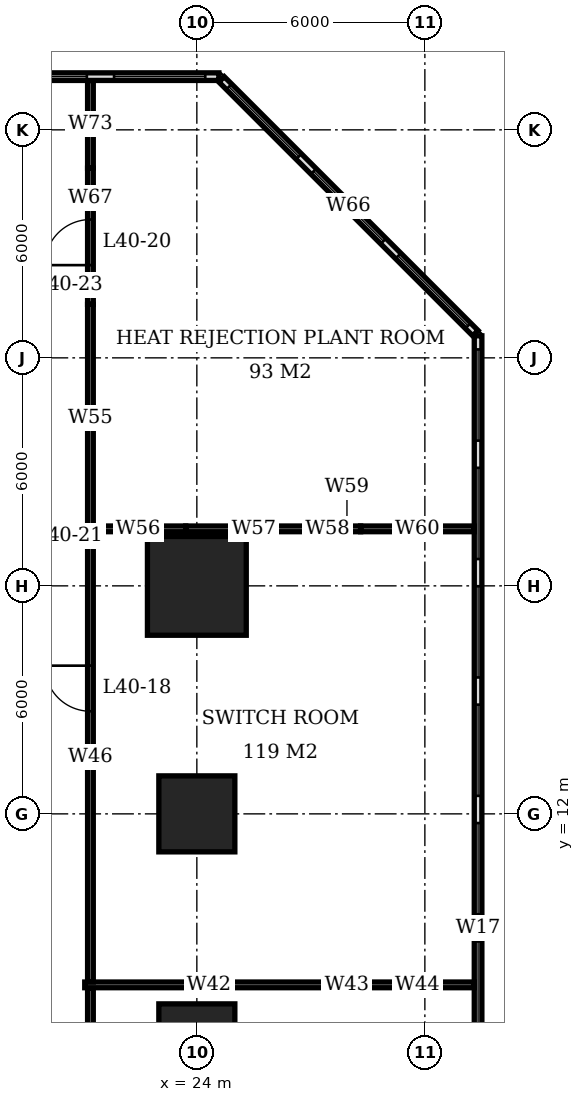
"""IFC4 building model, lengths in metres.
Left out: names, types, materials, properties, quantities, classifications, styles, units other than length and angle.
Written with IfcOpenShell. Run it as: python <this file> out.ifc"""

import sys

from ifc_helpers import new_model, si_unit, direction, frame, frame_2d, origin, origin_2d, place, context, subcontext, project, spatial, rectangle, extrude, element, fill, save


model = new_model("IFC4")
c1 = context("Model", 3, precision=1e-05, world=origin(), true_north=direction((0.0, 1.0)))
c2 = subcontext(c1, "Body", "Model", "MODEL_VIEW")
j1 = project(units=[si_unit("LENGTHUNIT", "METRE"), si_unit("PLANEANGLEUNIT", "RADIAN")], contexts=[c1])
p1 = place(None, origin())
s1 = spatial("IfcSite", under=j1, at=p1, CompositionType="ELEMENT")
p2 = place(p1, origin())
s2 = spatial("IfcBuilding", under=s1, at=p2, CompositionType="ELEMENT")
p3 = place(p2, frame((0.0, 0.0, 164.0)))
s3 = spatial("IfcBuildingStorey", under=s2, at=p3, CompositionType="ELEMENT", Elevation=164.0)
for number, where, z_axis, x_axis in (
    (1, (24.0, 6.0, 0.0), (0.0, 0.0, 1.0), (1.0, 0.0, 0.0)),
    (2, (24.0, 12.0, 0.0), (0.0, 0.0, 1.0), (1.0, 0.0, 0.0)),
):
    element("IfcColumn", number, at=place(p3, frame(where, z_axis=z_axis, x_axis=x_axis)), inside=s3, PredefinedType="COLUMN", context=c2, shape_type="SweptSolid", body=[
        extrude(rectangle(XDim=2.0, YDim=2.0, at=origin_2d()), origin(), (0.0, 0.0, 1.0), 5.4),
    ])
p4 = place(p3, frame((24.0, 18.0, 0.0), z_axis=(0.0, 0.0, 1.0), x_axis=(1.0, 0.0, 0.0)))
e3 = element("IfcColumn", 3, at=p4, inside=s3, PredefinedType="COLUMN", context=c2, shape_type="SweptSolid", body=[
    extrude(rectangle(XDim=2.6, YDim=2.6, at=origin_2d()), origin(), (0.0, 0.0, 1.0), 5.4),
])
p5 = place(p3, frame((31.4, -6.58, 0.0), z_axis=(0.0, 0.0, 1.0), x_axis=(0.0, 1.0, 0.0)))
e4 = element("IfcWall", 4, at=p5, inside=s3, PredefinedType="USERDEFINED", context=c2, shape_type="SweptSolid", body=[
    extrude(rectangle(XDim=31.16, YDim=0.2, at=frame_2d((15.58, 0.0))), origin(), (0.0, 0.0, 1.0), 5.4),
])
p6 = place(p5, frame((0.358, 0.0, 0.6)))
e5 = element("IfcOpeningElement", 5, at=p6, cuts=e4, PredefinedType="OPENING", context=c2, shape_type="SweptSolid", body=[
    extrude(rectangle(XDim=2.4, YDim=3.0, at=frame_2d((1.2, 1.5))), frame((0.0, 0.11, 0.0), z_axis=(0.0, -1.0, 0.0), x_axis=(1.0, 0.0, 0.0)), (0.0, 0.0, 1.0), 0.22),
])
p7 = place(p5, frame((3.474, 0.0, 0.6)))
e6 = element("IfcOpeningElement", 6, at=p7, cuts=e4, PredefinedType="OPENING", context=c2, shape_type="SweptSolid", body=[
    extrude(rectangle(XDim=2.4, YDim=3.0, at=frame_2d((1.2, 1.5))), frame((0.0, 0.11, 0.0), z_axis=(0.0, -1.0, 0.0), x_axis=(1.0, 0.0, 0.0)), (0.0, 0.0, 1.0), 0.22),
])
p8 = place(p5, frame((6.59, 0.0, 0.6)))
e7 = element("IfcOpeningElement", 7, at=p8, cuts=e4, PredefinedType="OPENING", context=c2, shape_type="SweptSolid", body=[
    extrude(rectangle(XDim=2.4, YDim=3.0, at=frame_2d((1.2, 1.5))), frame((0.0, 0.11, 0.0), z_axis=(0.0, -1.0, 0.0), x_axis=(1.0, 0.0, 0.0)), (0.0, 0.0, 1.0), 0.22),
])
p9 = place(p5, frame((9.706, 0.0, 0.6)))
e8 = element("IfcOpeningElement", 8, at=p9, cuts=e4, PredefinedType="OPENING", context=c2, shape_type="SweptSolid", body=[
    extrude(rectangle(XDim=2.4, YDim=3.0, at=frame_2d((1.2, 1.5))), frame((0.0, 0.11, 0.0), z_axis=(0.0, -1.0, 0.0), x_axis=(1.0, 0.0, 0.0)), (0.0, 0.0, 1.0), 0.22),
])
p10 = place(p5, frame((12.822, 0.0, 0.6)))
e9 = element("IfcOpeningElement", 9, at=p10, cuts=e4, PredefinedType="OPENING", context=c2, shape_type="SweptSolid", body=[
    extrude(rectangle(XDim=2.4, YDim=3.0, at=frame_2d((1.2, 1.5))), frame((0.0, 0.11, 0.0), z_axis=(0.0, -1.0, 0.0), x_axis=(1.0, 0.0, 0.0)), (0.0, 0.0, 1.0), 0.22),
])
p11 = place(p5, frame((15.938, 0.0, 0.6)))
e10 = element("IfcOpeningElement", 10, at=p11, cuts=e4, PredefinedType="OPENING", context=c2, shape_type="SweptSolid", body=[
    extrude(rectangle(XDim=2.4, YDim=3.0, at=frame_2d((1.2, 1.5))), frame((0.0, 0.11, 0.0), z_axis=(0.0, -1.0, 0.0), x_axis=(1.0, 0.0, 0.0)), (0.0, 0.0, 1.0), 0.22),
])
p12 = place(p5, frame((19.054, 0.0, 0.6)))
e11 = element("IfcOpeningElement", 11, at=p12, cuts=e4, PredefinedType="OPENING", context=c2, shape_type="SweptSolid", body=[
    extrude(rectangle(XDim=2.4, YDim=3.0, at=frame_2d((1.2, 1.5))), frame((0.0, 0.11, 0.0), z_axis=(0.0, -1.0, 0.0), x_axis=(1.0, 0.0, 0.0)), (0.0, 0.0, 1.0), 0.22),
])
p13 = place(p5, frame((22.17, 0.0, 0.6)))
e12 = element("IfcOpeningElement", 12, at=p13, cuts=e4, PredefinedType="OPENING", context=c2, shape_type="SweptSolid", body=[
    extrude(rectangle(XDim=2.4, YDim=3.0, at=frame_2d((1.2, 1.5))), frame((0.0, 0.11, 0.0), z_axis=(0.0, -1.0, 0.0), x_axis=(1.0, 0.0, 0.0)), (0.0, 0.0, 1.0), 0.22),
])
p14 = place(p5, frame((25.286, 0.0, 0.6)))
e13 = element("IfcOpeningElement", 13, at=p14, cuts=e4, PredefinedType="OPENING", context=c2, shape_type="SweptSolid", body=[
    extrude(rectangle(XDim=2.4, YDim=3.0, at=frame_2d((1.2, 1.5))), frame((0.0, 0.11, 0.0), z_axis=(0.0, -1.0, 0.0), x_axis=(1.0, 0.0, 0.0)), (0.0, 0.0, 1.0), 0.22),
])
p15 = place(p5, frame((28.402, 0.0, 0.6)))
e14 = element("IfcOpeningElement", 14, at=p15, cuts=e4, PredefinedType="OPENING", context=c2, shape_type="SweptSolid", body=[
    extrude(rectangle(XDim=2.4, YDim=3.0, at=frame_2d((1.2, 1.5))), frame((0.0, 0.11, 0.0), z_axis=(0.0, -1.0, 0.0), x_axis=(1.0, 0.0, 0.0)), (0.0, 0.0, 1.0), 0.22),
])
p16 = place(p3, frame((31.329, 24.651, 0.0), z_axis=(0.0, 0.0, 1.0), x_axis=(-0.707106781187, 0.707106781187, 0.0)))
e15 = element("IfcWall", 15, at=p16, inside=s3, PredefinedType="USERDEFINED", context=c2, shape_type="SweptSolid", body=[
    extrude(rectangle(XDim=9.445, YDim=0.2, at=frame_2d((4.723, 0.0))), origin(), (0.0, 0.0, 1.0), 5.4),
])
p17 = place(p16, frame((0.274, 0.0, 0.6)))
e16 = element("IfcOpeningElement", 16, at=p17, cuts=e15, PredefinedType="OPENING", context=c2, shape_type="SweptSolid", body=[
    extrude(rectangle(XDim=2.6, YDim=3.0, at=frame_2d((1.3, 1.5))), frame((0.0, 0.11, 0.0), z_axis=(0.0, -1.0, 0.0), x_axis=(1.0, 0.0, 0.0)), (0.0, 0.0, 1.0), 0.22),
])
p18 = place(p16, frame((3.423, 0.0, 0.6)))
e17 = element("IfcOpeningElement", 17, at=p18, cuts=e15, PredefinedType="OPENING", context=c2, shape_type="SweptSolid", body=[
    extrude(rectangle(XDim=2.6, YDim=3.0, at=frame_2d((1.3, 1.5))), frame((0.0, 0.11, 0.0), z_axis=(0.0, -1.0, 0.0), x_axis=(1.0, 0.0, 0.0)), (0.0, 0.0, 1.0), 0.22),
])
p19 = place(p16, frame((6.571, 0.0, 0.6)))
e18 = element("IfcOpeningElement", 18, at=p19, cuts=e15, PredefinedType="OPENING", context=c2, shape_type="SweptSolid", body=[
    extrude(rectangle(XDim=2.6, YDim=3.0, at=frame_2d((1.3, 1.5))), frame((0.0, 0.11, 0.0), z_axis=(0.0, -1.0, 0.0), x_axis=(1.0, 0.0, 0.0)), (0.0, 0.0, 1.0), 0.22),
])
p20 = place(p3, frame((24.58, 31.4, 0.0), z_axis=(0.0, 0.0, 1.0), x_axis=(-1.0, 0.0, 0.0)))
e19 = element("IfcWall", 19, at=p20, inside=s3, PredefinedType="USERDEFINED", context=c2, shape_type="SweptSolid", body=[
    extrude(rectangle(XDim=31.16, YDim=0.2, at=frame_2d((15.58, 0.0))), origin(), (0.0, 0.0, 1.0), 5.4),
])
p21 = place(p20, frame((0.358, 0.0, 0.6)))
e20 = element("IfcOpeningElement", 20, at=p21, cuts=e19, PredefinedType="OPENING", context=c2, shape_type="SweptSolid", body=[
    extrude(rectangle(XDim=2.4, YDim=3.0, at=frame_2d((1.2, 1.5))), frame((0.0, 0.11, 0.0), z_axis=(0.0, -1.0, 0.0), x_axis=(1.0, 0.0, 0.0)), (0.0, 0.0, 1.0), 0.22),
])
p22 = place(p20, frame((3.474, 0.0, 0.6)))
e21 = element("IfcOpeningElement", 21, at=p22, cuts=e19, PredefinedType="OPENING", context=c2, shape_type="SweptSolid", body=[
    extrude(rectangle(XDim=2.4, YDim=3.0, at=frame_2d((1.2, 1.5))), frame((0.0, 0.11, 0.0), z_axis=(0.0, -1.0, 0.0), x_axis=(1.0, 0.0, 0.0)), (0.0, 0.0, 1.0), 0.22),
])
p23 = place(p20, frame((6.59, 0.0, 0.6)))
e22 = element("IfcOpeningElement", 22, at=p23, cuts=e19, PredefinedType="OPENING", context=c2, shape_type="SweptSolid", body=[
    extrude(rectangle(XDim=2.4, YDim=3.0, at=frame_2d((1.2, 1.5))), frame((0.0, 0.11, 0.0), z_axis=(0.0, -1.0, 0.0), x_axis=(1.0, 0.0, 0.0)), (0.0, 0.0, 1.0), 0.22),
])
p24 = place(p20, frame((9.706, 0.0, 0.6)))
e23 = element("IfcOpeningElement", 23, at=p24, cuts=e19, PredefinedType="OPENING", context=c2, shape_type="SweptSolid", body=[
    extrude(rectangle(XDim=2.4, YDim=3.0, at=frame_2d((1.2, 1.5))), frame((0.0, 0.11, 0.0), z_axis=(0.0, -1.0, 0.0), x_axis=(1.0, 0.0, 0.0)), (0.0, 0.0, 1.0), 0.22),
])
p25 = place(p20, frame((12.822, 0.0, 0.6)))
e24 = element("IfcOpeningElement", 24, at=p25, cuts=e19, PredefinedType="OPENING", context=c2, shape_type="SweptSolid", body=[
    extrude(rectangle(XDim=2.4, YDim=3.0, at=frame_2d((1.2, 1.5))), frame((0.0, 0.11, 0.0), z_axis=(0.0, -1.0, 0.0), x_axis=(1.0, 0.0, 0.0)), (0.0, 0.0, 1.0), 0.22),
])
p26 = place(p20, frame((15.938, 0.0, 0.6)))
e25 = element("IfcOpeningElement", 25, at=p26, cuts=e19, PredefinedType="OPENING", context=c2, shape_type="SweptSolid", body=[
    extrude(rectangle(XDim=2.4, YDim=3.0, at=frame_2d((1.2, 1.5))), frame((0.0, 0.11, 0.0), z_axis=(0.0, -1.0, 0.0), x_axis=(1.0, 0.0, 0.0)), (0.0, 0.0, 1.0), 0.22),
])
p27 = place(p20, frame((19.054, 0.0, 0.6)))
e26 = element("IfcOpeningElement", 26, at=p27, cuts=e19, PredefinedType="OPENING", context=c2, shape_type="SweptSolid", body=[
    extrude(rectangle(XDim=2.4, YDim=3.0, at=frame_2d((1.2, 1.5))), frame((0.0, 0.11, 0.0), z_axis=(0.0, -1.0, 0.0), x_axis=(1.0, 0.0, 0.0)), (0.0, 0.0, 1.0), 0.22),
])
p28 = place(p20, frame((22.17, 0.0, 0.6)))
e27 = element("IfcOpeningElement", 27, at=p28, cuts=e19, PredefinedType="OPENING", context=c2, shape_type="SweptSolid", body=[
    extrude(rectangle(XDim=2.4, YDim=3.0, at=frame_2d((1.2, 1.5))), frame((0.0, 0.11, 0.0), z_axis=(0.0, -1.0, 0.0), x_axis=(1.0, 0.0, 0.0)), (0.0, 0.0, 1.0), 0.22),
])
p29 = place(p20, frame((25.286, 0.0, 0.6)))
e28 = element("IfcOpeningElement", 28, at=p29, cuts=e19, PredefinedType="OPENING", context=c2, shape_type="SweptSolid", body=[
    extrude(rectangle(XDim=2.4, YDim=3.0, at=frame_2d((1.2, 1.5))), frame((0.0, 0.11, 0.0), z_axis=(0.0, -1.0, 0.0), x_axis=(1.0, 0.0, 0.0)), (0.0, 0.0, 1.0), 0.22),
])
p30 = place(p20, frame((28.402, 0.0, 0.6)))
e29 = element("IfcOpeningElement", 29, at=p30, cuts=e19, PredefinedType="OPENING", context=c2, shape_type="SweptSolid", body=[
    extrude(rectangle(XDim=2.4, YDim=3.0, at=frame_2d((1.2, 1.5))), frame((0.0, 0.11, 0.0), z_axis=(0.0, -1.0, 0.0), x_axis=(1.0, 0.0, 0.0)), (0.0, 0.0, 1.0), 0.22),
])
p31 = place(p3, frame((21.2, -1.425, 0.0), z_axis=(0.0, 0.0, 1.0), x_axis=(0.0, 1.0, 0.0)))
e30 = element("IfcWall", 30, at=p31, inside=s3, PredefinedType="PARTITIONING", context=c2, shape_type="SweptSolid", body=[
    extrude(rectangle(XDim=8.85, YDim=0.15, at=frame_2d((4.425, 0.0))), origin(), (0.0, 0.0, 1.0), 5.15),
])
p32 = place(p31, frame((5.175, 0.0, 0.0)))
e31 = element("IfcOpeningElement", 31, at=p32, cuts=e30, PredefinedType="OPENING", context=c2, shape_type="SweptSolid", body=[
    extrude(rectangle(XDim=1.2, YDim=2.4, at=frame_2d((0.6, 1.2))), frame((0.0, 0.085, 0.0), z_axis=(0.0, -1.0, 0.0), x_axis=(1.0, 0.0, 0.0)), (0.0, 0.0, 1.0), 0.17),
])
p33 = place(p3, frame((21.2, 7.575, 0.0), z_axis=(0.0, 0.0, 1.0), x_axis=(0.0, 1.0, 0.0)))
e32 = element("IfcWall", 32, at=p33, inside=s3, PredefinedType="PARTITIONING", context=c2, shape_type="SweptSolid", body=[
    extrude(rectangle(XDim=11.85, YDim=0.15, at=frame_2d((5.925, 0.0))), origin(), (0.0, 0.0, 1.0), 5.15),
])
p34 = place(p33, frame((7.125, 0.0, 0.0)))
e33 = element("IfcOpeningElement", 33, at=p34, cuts=e32, PredefinedType="OPENING", context=c2, shape_type="SweptSolid", body=[
    extrude(rectangle(XDim=1.2, YDim=2.4, at=frame_2d((0.6, 1.2))), frame((0.0, 0.085, 0.0), z_axis=(0.0, -1.0, 0.0), x_axis=(1.0, 0.0, 0.0)), (0.0, 0.0, 1.0), 0.17),
])
p35 = place(p3, frame((21.05, 7.5, 0.0), z_axis=(0.0, 0.0, 1.0), x_axis=(1.0, 0.0, 0.0)))
e34 = element("IfcWall", 34, at=p35, inside=s3, PredefinedType="PARTITIONING", context=c2, shape_type="SweptSolid", body=[
    extrude(rectangle(XDim=6.54, YDim=0.15, at=frame_2d((3.27, 0.0))), origin(), (0.0, 0.0, 1.0), 5.15),
])
p36 = place(p3, frame((27.59, 7.5, 0.0), z_axis=(0.0, 0.0, 1.0), x_axis=(1.0, 0.0, 0.0)))
e35 = element("IfcWall", 35, at=p36, inside=s3, PredefinedType="PARTITIONING", context=c2, shape_type="SweptSolid", body=[
    extrude(rectangle(XDim=0.72, YDim=0.15, at=frame_2d((0.36, 0.0))), origin(), (0.0, 0.0, 1.0), 4.15),
])
p37 = place(p3, frame((28.31, 7.5, 0.0), z_axis=(0.0, 0.0, 1.0), x_axis=(1.0, 0.0, 0.0)))
e36 = element("IfcWall", 36, at=p37, inside=s3, PredefinedType="PARTITIONING", context=c2, shape_type="SweptSolid", body=[
    extrude(rectangle(XDim=2.99, YDim=0.15, at=frame_2d((1.495, 0.0))), origin(), (0.0, 0.0, 1.0), 5.15),
])
p38 = place(p3, frame((21.2, 19.425, 0.0), z_axis=(0.0, 0.0, 1.0), x_axis=(0.0, 1.0, 0.0)))
e37 = element("IfcWall", 37, at=p38, inside=s3, PredefinedType="PARTITIONING", context=c2, shape_type="SweptSolid", body=[
    extrude(rectangle(XDim=5.983, YDim=0.15, at=frame_2d((2.991, 0.0))), origin(), (0.0, 0.0, 1.0), 5.15),
])
p39 = place(p3, frame((21.2, 25.408, 0.0), z_axis=(0.0, 0.0, 1.0), x_axis=(0.0, 1.0, 0.0)))
e38 = element("IfcWall", 38, at=p39, inside=s3, PredefinedType="PARTITIONING", context=c2, shape_type="SweptSolid", body=[
    extrude(rectangle(XDim=3.584, YDim=0.15, at=frame_2d((1.792, 0.0))), origin(), (0.0, 0.0, 1.0), 4.15),
])
p40 = place(p39, frame((1.032, 0.0, 0.0)))
e39 = element("IfcOpeningElement", 39, at=p40, cuts=e38, PredefinedType="OPENING", context=c2, shape_type="SweptSolid", body=[
    extrude(rectangle(XDim=1.2, YDim=2.4, at=frame_2d((0.6, 1.2))), frame((0.0, 0.085, 0.0), z_axis=(0.0, -1.0, 0.0), x_axis=(1.0, 0.0, 0.0)), (0.0, 0.0, 1.0), 0.17),
])
p41 = place(p3, frame((21.2, 28.992, 0.0), z_axis=(0.0, 0.0, 1.0), x_axis=(0.0, 1.0, 0.0)))
e40 = element("IfcWall", 40, at=p41, inside=s3, PredefinedType="PARTITIONING", context=c2, shape_type="SweptSolid", body=[
    extrude(rectangle(XDim=2.308, YDim=0.15, at=frame_2d((1.154, 0.0))), origin(), (0.0, 0.0, 1.0), 5.15),
])
p42 = place(p3, frame((21.2, 19.5, 0.0), z_axis=(0.0, 0.0, 1.0), x_axis=(1.0, 0.0, 0.0)))
e41 = element("IfcWall", 41, at=p42, inside=s3, PredefinedType="PARTITIONING", context=c2, shape_type="SweptSolid", body=[
    extrude(rectangle(XDim=2.508, YDim=0.15, at=frame_2d((1.254, 0.0))), origin(), (0.0, 0.0, 1.0), 5.15),
])
p43 = place(p3, frame((23.708, 19.5, 0.0), z_axis=(0.0, 0.0, 1.0), x_axis=(1.0, 0.0, 0.0)))
e42 = element("IfcWall", 42, at=p43, inside=s3, PredefinedType="PARTITIONING", context=c2, shape_type="SweptSolid", body=[
    extrude(rectangle(XDim=3.584, YDim=0.15, at=frame_2d((1.792, 0.0))), origin(), (0.0, 0.0, 1.0), 4.15),
])
p44 = place(p3, frame((27.292, 19.5, 0.0), z_axis=(0.0, 0.0, 1.0), x_axis=(1.0, 0.0, 0.0)))
e43 = element("IfcWall", 43, at=p44, inside=s3, PredefinedType="PARTITIONING", context=c2, shape_type="SweptSolid", body=[
    extrude(rectangle(XDim=0.298, YDim=0.15, at=frame_2d((0.149, 0.0))), origin(), (0.0, 0.0, 1.0), 5.15),
])
p45 = place(p3, frame((27.59, 19.5, 0.0), z_axis=(0.0, 0.0, 1.0), x_axis=(1.0, 0.0, 0.0)))
e44 = element("IfcWall", 44, at=p45, inside=s3, PredefinedType="PARTITIONING", context=c2, shape_type="SweptSolid", body=[
    extrude(rectangle(XDim=0.72, YDim=0.15, at=frame_2d((0.36, 0.0))), origin(), (0.0, 0.0, 1.0), 4.15),
])
p46 = place(p3, frame((28.31, 19.5, 0.0), z_axis=(0.0, 0.0, 1.0), x_axis=(1.0, 0.0, 0.0)))
e45 = element("IfcWall", 45, at=p46, inside=s3, PredefinedType="PARTITIONING", context=c2, shape_type="SweptSolid", body=[
    extrude(rectangle(XDim=2.99, YDim=0.15, at=frame_2d((1.495, 0.0))), origin(), (0.0, 0.0, 1.0), 5.15),
])
p47 = place(p10, origin())
e46 = element("IfcWindow", 46, at=p47, inside=s3, PartitioningType="SINGLE_PANEL", PredefinedType="USERDEFINED", context=c2, shape_type="SweptSolid", body=[
    extrude(rectangle(XDim=2.4, YDim=3.0, at=frame_2d((1.2, 1.5))), frame((0.0, 0.03, 0.0), z_axis=(0.0, -1.0, 0.0), x_axis=(1.0, 0.0, 0.0)), (0.0, 0.0, 1.0), 0.06),
])
fill(e9, e46)
p48 = place(p11, origin())
e47 = element("IfcWindow", 47, at=p48, inside=s3, PartitioningType="SINGLE_PANEL", PredefinedType="USERDEFINED", context=c2, shape_type="SweptSolid", body=[
    extrude(rectangle(XDim=2.4, YDim=3.0, at=frame_2d((1.2, 1.5))), frame((0.0, 0.03, 0.0), z_axis=(0.0, -1.0, 0.0), x_axis=(1.0, 0.0, 0.0)), (0.0, 0.0, 1.0), 0.06),
])
fill(e10, e47)
p49 = place(p12, origin())
e48 = element("IfcWindow", 48, at=p49, inside=s3, PartitioningType="SINGLE_PANEL", PredefinedType="USERDEFINED", context=c2, shape_type="SweptSolid", body=[
    extrude(rectangle(XDim=2.4, YDim=3.0, at=frame_2d((1.2, 1.5))), frame((0.0, 0.03, 0.0), z_axis=(0.0, -1.0, 0.0), x_axis=(1.0, 0.0, 0.0)), (0.0, 0.0, 1.0), 0.06),
])
fill(e11, e48)
p50 = place(p13, origin())
e49 = element("IfcWindow", 49, at=p50, inside=s3, PartitioningType="SINGLE_PANEL", PredefinedType="USERDEFINED", context=c2, shape_type="SweptSolid", body=[
    extrude(rectangle(XDim=2.4, YDim=3.0, at=frame_2d((1.2, 1.5))), frame((0.0, 0.03, 0.0), z_axis=(0.0, -1.0, 0.0), x_axis=(1.0, 0.0, 0.0)), (0.0, 0.0, 1.0), 0.06),
])
fill(e12, e49)
p51 = place(p14, origin())
e50 = element("IfcWindow", 50, at=p51, inside=s3, PartitioningType="SINGLE_PANEL", PredefinedType="USERDEFINED", context=c2, shape_type="SweptSolid", body=[
    extrude(rectangle(XDim=2.4, YDim=3.0, at=frame_2d((1.2, 1.5))), frame((0.0, 0.03, 0.0), z_axis=(0.0, -1.0, 0.0), x_axis=(1.0, 0.0, 0.0)), (0.0, 0.0, 1.0), 0.06),
])
fill(e13, e50)
p52 = place(p15, origin())
e51 = element("IfcWindow", 51, at=p52, inside=s3, PartitioningType="SINGLE_PANEL", PredefinedType="USERDEFINED", context=c2, shape_type="SweptSolid", body=[
    extrude(rectangle(XDim=2.4, YDim=3.0, at=frame_2d((1.2, 1.5))), frame((0.0, 0.03, 0.0), z_axis=(0.0, -1.0, 0.0), x_axis=(1.0, 0.0, 0.0)), (0.0, 0.0, 1.0), 0.06),
])
fill(e14, e51)
p53 = place(p17, origin())
e52 = element("IfcWindow", 52, at=p53, inside=s3, PartitioningType="SINGLE_PANEL", PredefinedType="USERDEFINED", context=c2, shape_type="SweptSolid", body=[
    extrude(rectangle(XDim=2.6, YDim=3.0, at=frame_2d((1.3, 1.5))), frame((0.0, 0.03, 0.0), z_axis=(0.0, -1.0, 0.0), x_axis=(1.0, 0.0, 0.0)), (0.0, 0.0, 1.0), 0.06),
])
fill(e16, e52)
p54 = place(p18, origin())
e53 = element("IfcWindow", 53, at=p54, inside=s3, PartitioningType="SINGLE_PANEL", PredefinedType="USERDEFINED", context=c2, shape_type="SweptSolid", body=[
    extrude(rectangle(XDim=2.6, YDim=3.0, at=frame_2d((1.3, 1.5))), frame((0.0, 0.03, 0.0), z_axis=(0.0, -1.0, 0.0), x_axis=(1.0, 0.0, 0.0)), (0.0, 0.0, 1.0), 0.06),
])
fill(e17, e53)
p55 = place(p19, origin())
e54 = element("IfcWindow", 54, at=p55, inside=s3, PartitioningType="SINGLE_PANEL", PredefinedType="USERDEFINED", context=c2, shape_type="SweptSolid", body=[
    extrude(rectangle(XDim=2.6, YDim=3.0, at=frame_2d((1.3, 1.5))), frame((0.0, 0.03, 0.0), z_axis=(0.0, -1.0, 0.0), x_axis=(1.0, 0.0, 0.0)), (0.0, 0.0, 1.0), 0.06),
])
fill(e18, e54)
p56 = place(p21, origin())
e55 = element("IfcWindow", 55, at=p56, inside=s3, PartitioningType="SINGLE_PANEL", PredefinedType="USERDEFINED", context=c2, shape_type="SweptSolid", body=[
    extrude(rectangle(XDim=2.4, YDim=3.0, at=frame_2d((1.2, 1.5))), frame((0.0, 0.03, 0.0), z_axis=(0.0, -1.0, 0.0), x_axis=(1.0, 0.0, 0.0)), (0.0, 0.0, 1.0), 0.06),
])
fill(e20, e55)
p57 = place(p22, origin())
e56 = element("IfcWindow", 56, at=p57, inside=s3, PartitioningType="SINGLE_PANEL", PredefinedType="USERDEFINED", context=c2, shape_type="SweptSolid", body=[
    extrude(rectangle(XDim=2.4, YDim=3.0, at=frame_2d((1.2, 1.5))), frame((0.0, 0.03, 0.0), z_axis=(0.0, -1.0, 0.0), x_axis=(1.0, 0.0, 0.0)), (0.0, 0.0, 1.0), 0.06),
])
fill(e21, e56)
p58 = place(p34, origin())
e57 = element("IfcDoor", 57, at=p58, inside=s3, OperationType="SINGLE_SWING_RIGHT", PredefinedType="DOOR", context=c2, shape_type="SweptSolid", body=[
    extrude(rectangle(XDim=1.2, YDim=2.4, at=frame_2d((0.6, 1.2))), frame((0.0, 0.025, 0.0), z_axis=(0.0, -1.0, 0.0), x_axis=(1.0, 0.0, 0.0)), (0.0, 0.0, 1.0), 0.05),
])
fill(e33, e57)
p59 = place(p40, origin())
e58 = element("IfcDoor", 58, at=p59, inside=s3, OperationType="SINGLE_SWING_LEFT", PredefinedType="DOOR", context=c2, shape_type="SweptSolid", body=[
    extrude(rectangle(XDim=1.2, YDim=2.4, at=frame_2d((0.6, 1.2))), frame((0.0, 0.025, 0.0), z_axis=(0.0, -1.0, 0.0), x_axis=(1.0, 0.0, 0.0)), (0.0, 0.0, 1.0), 0.05),
])
fill(e39, e58)
save(model, sys.argv[1])
